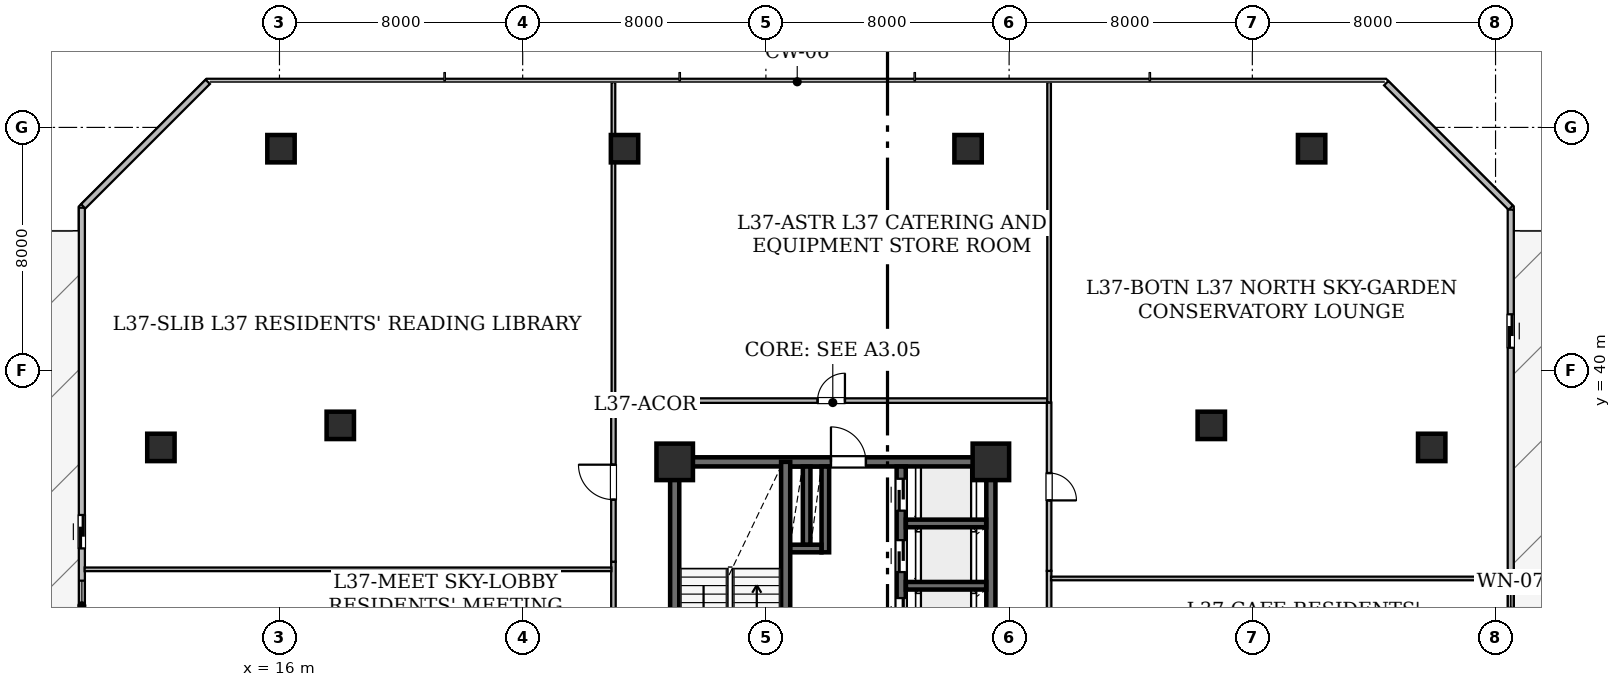
"""IFC4 building model, lengths in metres.
Left out: names, types, materials, properties, quantities, classifications, styles, units other than length and angle.
Written with IfcOpenShell. Run it as: python <this file> out.ifc"""

import sys

from ifc_helpers import new_model, si_unit, direction, frame, frame_2d, origin, origin_2d, place, context, subcontext, project, spatial, rectangle, hollow_rectangle, extrude, element, fill, save


model = new_model("IFC4")
c1 = context("Model", 3, precision=1e-05, world=origin(), true_north=direction((0.0, 1.0)))
c2 = subcontext(c1, "Body", "Model", "MODEL_VIEW")
j1 = project(units=[si_unit("LENGTHUNIT", "METRE"), si_unit("PLANEANGLEUNIT", "RADIAN")], contexts=[c1])
p1 = place(None, origin())
s1 = spatial("IfcSite", under=j1, at=p1, CompositionType="ELEMENT")
p2 = place(p1, origin())
s2 = spatial("IfcBuilding", under=s1, at=p2, CompositionType="ELEMENT")
p3 = place(p2, frame((0.0, 0.0, 145.7)))
s3 = spatial("IfcBuildingStorey", under=s2, at=p3, CompositionType="ELEMENT", Elevation=145.7)
for number, where, z_axis, x_axis in (
    (1, (29.0, 37.0, 0.0), (0.0, 0.0, 1.0), (1.0, 0.0, 0.0)),
    (2, (39.4, 37.0, 0.0), (0.0, 0.0, 1.0), (1.0, 0.0, 0.0)),
):
    element("IfcColumn", number, at=place(p3, frame(where, z_axis=z_axis, x_axis=x_axis)), inside=s3, PredefinedType="COLUMN", context=c2, shape_type="SweptSolid", body=[
        extrude(hollow_rectangle(XDim=1.2, YDim=1.2, WallThickness=0.06, at=origin_2d()), origin(), (0.0, 0.0, 1.0), 4.8),
    ])
for number, where, z_axis, x_axis in (
    (3, (16.05, 47.3, 0.0), (0.0, 0.0, 1.0), (1.0, 0.0, 0.0)),
    (4, (27.35, 47.3, 0.0), (0.0, 0.0, 1.0), (1.0, 0.0, 0.0)),
    (5, (38.65, 47.3, 0.0), (0.0, 0.0, 1.0), (1.0, 0.0, 0.0)),
    (6, (49.95, 47.3, 0.0), (0.0, 0.0, 1.0), (1.0, 0.0, 0.0)),
    (7, (12.1, 37.475, 0.0), (0.0, 0.0, 1.0), (1.0, 0.0, 0.0)),
    (8, (53.9, 37.475, 0.0), (0.0, 0.0, 1.0), (1.0, 0.0, 0.0)),
    (9, (18.0, 38.2, 0.0), (0.0, 0.0, 1.0), (1.0, 0.0, 0.0)),
    (10, (46.65, 38.2, 0.0), (0.0, 0.0, 1.0), (1.0, 0.0, 0.0)),
):
    element("IfcColumn", number, at=place(p3, frame(where, z_axis=z_axis, x_axis=x_axis)), inside=s3, PredefinedType="COLUMN", context=c2, shape_type="SweptSolid", body=[
        extrude(hollow_rectangle(XDim=0.9, YDim=0.9, WallThickness=0.045, at=origin_2d()), origin(), (0.0, 0.0, 1.0), 4.8),
    ])
p4 = place(p3, frame((9.5, 31.284, 0.0), z_axis=(0.0, 0.0, 1.0), x_axis=(0.0, 1.0, 0.0)))
e11 = element("IfcWall", 11, at=p4, inside=s3, PredefinedType="STANDARD", context=c2, shape_type="SweptSolid", body=[
    extrude(rectangle(XDim=14.075, YDim=0.2, at=frame_2d((7.038, 0.0))), origin(), (0.0, 0.0, 1.0), 4.48),
])
p5 = place(p4, frame((2.869, 0.0, 0.0)))
e12 = element("IfcOpeningElement", 12, at=p5, cuts=e11, PredefinedType="OPENING", context=c2, shape_type="SweptSolid", body=[
    extrude(rectangle(XDim=1.1, YDim=2.2, at=frame_2d((0.55, 1.1))), frame((0.0, 0.11, 0.0), z_axis=(0.0, -1.0, 0.0), x_axis=(1.0, 0.0, 0.0)), (0.0, 0.0, 1.0), 0.22),
])
p6 = place(p4, frame((0.158, 0.0, 0.85)))
e13 = element("IfcOpeningElement", 13, at=p6, cuts=e11, PredefinedType="OPENING", context=c2, shape_type="SweptSolid", body=[
    extrude(rectangle(XDim=1.65, YDim=1.55, at=frame_2d((0.825, 0.775))), frame((0.0, 0.11, 0.0), z_axis=(0.0, -1.0, 0.0), x_axis=(1.0, 0.0, 0.0)), (0.0, 0.0, 1.0), 0.22),
])
p7 = place(p3, frame((9.544, 45.403, 0.0), z_axis=(0.0, 0.0, 1.0), x_axis=(0.707127848917, 0.707085712828, 0.0)))
e14 = element("IfcWall", 14, at=p7, inside=s3, PredefinedType="STANDARD", context=c2, shape_type="SweptSolid", body=[
    extrude(rectangle(XDim=5.794, YDim=0.2, at=frame_2d((2.897, 0.0))), origin(), (0.0, 0.0, 1.0), 4.48),
])
p8 = place(p3, frame((52.404, 49.455, 0.0), z_axis=(0.0, 0.0, 1.0), x_axis=(0.707085707805, -0.70712785394, 0.0)))
e15 = element("IfcWall", 15, at=p8, inside=s3, PredefinedType="STANDARD", context=c2, shape_type="SweptSolid", body=[
    extrude(rectangle(XDim=5.793, YDim=0.2, at=frame_2d((2.896, 0.0))), origin(), (0.0, 0.0, 1.0), 4.48),
])
p9 = place(p3, frame((56.5, 45.296, 0.0), z_axis=(0.0, 0.0, 1.0), x_axis=(0.0, -1.0, 0.0)))
e16 = element("IfcWall", 16, at=p9, inside=s3, PredefinedType="STANDARD", context=c2, shape_type="SweptSolid", body=[
    extrude(rectangle(XDim=14.063, YDim=0.2, at=frame_2d((7.031, 0.0))), origin(), (0.0, 0.0, 1.0), 4.48),
])
p10 = place(p9, frame((3.443, 0.0, 0.0)))
e17 = element("IfcOpeningElement", 17, at=p10, cuts=e16, PredefinedType="OPENING", context=c2, shape_type="SweptSolid", body=[
    extrude(rectangle(XDim=1.1, YDim=2.2, at=frame_2d((0.55, 1.1))), frame((0.0, 0.11, 0.0), z_axis=(0.0, -1.0, 0.0), x_axis=(1.0, 0.0, 0.0)), (0.0, 0.0, 1.0), 0.22),
])
p11 = place(p9, frame((12.53, 0.0, 0.85)))
e18 = element("IfcOpeningElement", 18, at=p11, cuts=e16, PredefinedType="OPENING", context=c2, shape_type="SweptSolid", body=[
    extrude(rectangle(XDim=1.35, YDim=1.5, at=frame_2d((0.675, 0.75))), frame((0.0, 0.11, 0.0), z_axis=(0.0, -1.0, 0.0), x_axis=(1.0, 0.0, 0.0)), (0.0, 0.0, 1.0), 0.22),
])
p12 = place(p3, frame((29.0, 28.0, 0.0), z_axis=(0.0, 0.0, 1.0), x_axis=(0.0, 1.0, 0.0)))
e19 = element("IfcWall", 19, at=p12, inside=s3, PredefinedType="SHEAR", context=c2, shape_type="SweptSolid", body=[
    extrude(rectangle(XDim=9.0, YDim=0.3, at=frame_2d((4.5, 0.0))), origin(), (0.0, 0.0, 1.0), 4.48),
])
p13 = place(p3, frame((29.0, 37.0, 0.0), z_axis=(0.0, 0.0, 1.0), x_axis=(1.0, 0.0, 0.0)))
e20 = element("IfcWall", 20, at=p13, inside=s3, PredefinedType="SHEAR", context=c2, shape_type="SweptSolid", body=[
    extrude(rectangle(XDim=10.4, YDim=0.3, at=frame_2d((5.2, 0.0))), origin(), (0.0, 0.0, 1.0), 4.48),
])
p14 = place(p13, frame((5.14, 0.0, 0.0)))
e21 = element("IfcOpeningElement", 21, at=p14, cuts=e20, PredefinedType="OPENING", context=c2, shape_type="SweptSolid", body=[
    extrude(rectangle(XDim=1.15, YDim=2.2, at=frame_2d((0.575, 1.1))), frame((0.0, 0.16, 0.0), z_axis=(0.0, -1.0, 0.0), x_axis=(1.0, 0.0, 0.0)), (0.0, 0.0, 1.0), 0.32),
])
p15 = place(p3, frame((39.4, 24.4, 0.0), z_axis=(0.0, 0.0, 1.0), x_axis=(0.0, 1.0, 0.0)))
e22 = element("IfcWall", 22, at=p15, inside=s3, PredefinedType="SHEAR", context=c2, shape_type="SweptSolid", body=[
    extrude(rectangle(XDim=12.6, YDim=0.3, at=frame_2d((6.3, 0.0))), origin(), (0.0, 0.0, 1.0), 4.48),
])
p16 = place(p3, frame((32.65, 28.0, 0.0), z_axis=(0.0, 0.0, 1.0), x_axis=(0.0, 1.0, 0.0)))
e23 = element("IfcWall", 23, at=p16, inside=s3, PredefinedType="SHEAR", context=c2, shape_type="SweptSolid", body=[
    extrude(rectangle(XDim=9.0, YDim=0.3, at=frame_2d((4.5, 0.0))), origin(), (0.0, 0.0, 1.0), 4.48),
])
p17 = place(p16, frame((0.72, 0.0, 0.0)))
e24 = element("IfcOpeningElement", 24, at=p17, cuts=e23, PredefinedType="OPENING", context=c2, shape_type="SweptSolid", body=[
    extrude(rectangle(XDim=1.0, YDim=2.15, at=frame_2d((0.5, 1.075))), frame((0.0, 0.16, 0.0), z_axis=(0.0, -1.0, 0.0), x_axis=(1.0, 0.0, 0.0)), (0.0, 0.0, 1.0), 0.32),
])
p18 = place(p3, frame((36.45, 31.35, 0.0), z_axis=(0.0, 0.0, 1.0), x_axis=(0.0, 1.0, 0.0)))
e25 = element("IfcWall", 25, at=p18, inside=s3, PredefinedType="SHEAR", context=c2, shape_type="SweptSolid", body=[
    extrude(rectangle(XDim=5.496, YDim=0.3, at=frame_2d((2.748, 0.0))), origin(), (0.0, 0.0, 1.0), 4.48),
])
p19 = place(p18, frame((0.12, 0.0, 0.0)))
e26 = element("IfcOpeningElement", 26, at=p19, cuts=e25, PredefinedType="OPENING", context=c2, shape_type="SweptSolid", body=[
    extrude(rectangle(XDim=1.05, YDim=2.15, at=frame_2d((0.525, 1.075))), frame((0.0, 0.16, 0.0), z_axis=(0.0, -1.0, 0.0), x_axis=(1.0, 0.0, 0.0)), (0.0, 0.0, 1.0), 0.32),
])
p20 = place(p18, frame((2.025, 0.0, 0.0)))
e27 = element("IfcOpeningElement", 27, at=p20, cuts=e25, PredefinedType="OPENING", context=c2, shape_type="SweptSolid", body=[
    extrude(rectangle(XDim=1.05, YDim=2.15, at=frame_2d((0.525, 1.075))), frame((0.0, 0.16, 0.0), z_axis=(0.0, -1.0, 0.0), x_axis=(1.0, 0.0, 0.0)), (0.0, 0.0, 1.0), 0.32),
])
p21 = place(p18, frame((4.045, 0.0, 0.0)))
e28 = element("IfcOpeningElement", 28, at=p21, cuts=e25, PredefinedType="OPENING", context=c2, shape_type="SweptSolid", body=[
    extrude(rectangle(XDim=1.05, YDim=2.15, at=frame_2d((0.525, 1.075))), frame((0.0, 0.16, 0.0), z_axis=(0.0, -1.0, 0.0), x_axis=(1.0, 0.0, 0.0)), (0.0, 0.0, 1.0), 0.32),
])
for number, where, z_axis, x_axis in (
    (29, (36.604, 32.925, 0.0), (0.0, 0.0, 1.0), (1.0, 0.0, 0.0)),
    (30, (36.604, 34.975, 0.0), (0.0, 0.0, 1.0), (1.0, 0.0, 0.0)),
):
    element("IfcWall", number, at=place(p3, frame(where, z_axis=z_axis, x_axis=x_axis)), inside=s3, PredefinedType="SHEAR", context=c2, shape_type="SweptSolid", body=[
        extrude(rectangle(XDim=2.642, YDim=0.25, at=frame_2d((1.321, 0.0))), origin(), (0.0, 0.0, 1.0), 4.48),
    ])
p22 = place(p3, frame((33.955, 34.025, 0.0), z_axis=(0.0, 0.0, 1.0), x_axis=(0.0, 1.0, 0.0)))
e31 = element("IfcWall", 31, at=p22, inside=s3, PredefinedType="SHEAR", context=c2, shape_type="SweptSolid", body=[
    extrude(rectangle(XDim=2.821, YDim=0.25, at=frame_2d((1.411, 0.0))), origin(), (0.0, 0.0, 1.0), 4.48),
])
p23 = place(p3, frame((32.804, 34.15, 0.0), z_axis=(0.0, 0.0, 1.0), x_axis=(1.0, 0.0, 0.0)))
e32 = element("IfcWall", 32, at=p23, inside=s3, PredefinedType="SHEAR", context=c2, shape_type="SweptSolid", body=[
    extrude(rectangle(XDim=1.022, YDim=0.25, at=frame_2d((0.511, 0.0))), origin(), (0.0, 0.0, 1.0), 4.48),
])
p24 = place(p3, frame((33.34, 34.279, 0.0), z_axis=(0.0, 0.0, 1.0), x_axis=(0.0, 1.0, 0.0)))
e33 = element("IfcWall", 33, at=p24, inside=s3, PredefinedType="SHEAR", context=c2, shape_type="SweptSolid", body=[
    extrude(rectangle(XDim=2.567, YDim=0.25, at=frame_2d((1.283, 0.0))), origin(), (0.0, 0.0, 1.0), 4.48),
])
p25 = place(p3, frame((26.985, 28.314, 0.0), z_axis=(0.0, 0.0, 1.0), x_axis=(0.0, 1.0, 0.0)))
e34 = element("IfcWall", 34, at=p25, inside=s3, PredefinedType="STANDARD", context=c2, shape_type="SweptSolid", body=[
    extrude(rectangle(XDim=5.4, YDim=0.15, at=frame_2d((2.7, 0.0))), origin(), (0.0, 0.0, 1.0), 4.48),
])
p26 = place(p25, frame((2.229, 0.0, 0.0)))
e35 = element("IfcOpeningElement", 35, at=p26, cuts=e34, PredefinedType="OPENING", context=c2, shape_type="SweptSolid", body=[
    extrude(rectangle(XDim=0.9, YDim=2.1, at=frame_2d((0.45, 1.05))), frame((0.0, 0.085, 0.0), z_axis=(0.0, -1.0, 0.0), x_axis=(1.0, 0.0, 0.0)), (0.0, 0.0, 1.0), 0.17),
])
p27 = place(p3, frame((26.985, 33.714, 0.0), z_axis=(0.0, 0.0, 1.0), x_axis=(0.0, 1.0, 0.0)))
e36 = element("IfcWall", 36, at=p27, inside=s3, PredefinedType="STANDARD", context=c2, shape_type="SweptSolid", body=[
    extrude(rectangle(XDim=5.236, YDim=0.15, at=frame_2d((2.618, 0.0))), origin(), (0.0, 0.0, 1.0), 3.775),
])
p28 = place(p27, frame((2.043, 0.0, 0.0)))
e37 = element("IfcOpeningElement", 37, at=p28, cuts=e36, PredefinedType="OPENING", context=c2, shape_type="SweptSolid", body=[
    extrude(rectangle(XDim=1.15, YDim=2.2, at=frame_2d((0.575, 1.1))), frame((0.0, 0.085, 0.0), z_axis=(0.0, -1.0, 0.0), x_axis=(1.0, 0.0, 0.0)), (0.0, 0.0, 1.0), 0.17),
])
p29 = place(p3, frame((41.315, 33.414, 0.0), z_axis=(0.0, 0.0, 1.0), x_axis=(0.0, -1.0, 0.0)))
e38 = element("IfcWall", 38, at=p29, inside=s3, PredefinedType="STANDARD", context=c2, shape_type="SweptSolid", body=[
    extrude(rectangle(XDim=5.1, YDim=0.15, at=frame_2d((2.55, 0.0))), origin(), (0.0, 0.0, 1.0), 4.48),
])
p30 = place(p29, frame((1.996, 0.0, 0.0)))
e39 = element("IfcOpeningElement", 39, at=p30, cuts=e38, PredefinedType="OPENING", context=c2, shape_type="SweptSolid", body=[
    extrude(rectangle(XDim=1.15, YDim=2.2, at=frame_2d((0.575, 1.1))), frame((0.0, 0.085, 0.0), z_axis=(0.0, -1.0, 0.0), x_axis=(1.0, 0.0, 0.0)), (0.0, 0.0, 1.0), 0.17),
])
p31 = place(p3, frame((41.315, 38.95, 0.0), z_axis=(0.0, 0.0, 1.0), x_axis=(0.0, -1.0, 0.0)))
e40 = element("IfcWall", 40, at=p31, inside=s3, PredefinedType="STANDARD", context=c2, shape_type="SweptSolid", body=[
    extrude(rectangle(XDim=5.536, YDim=0.15, at=frame_2d((2.768, 0.0))), origin(), (0.0, 0.0, 1.0), 3.775),
])
p32 = place(p31, frame((2.318, 0.0, 0.0)))
e41 = element("IfcOpeningElement", 41, at=p32, cuts=e40, PredefinedType="OPENING", context=c2, shape_type="SweptSolid", body=[
    extrude(rectangle(XDim=0.9, YDim=2.1, at=frame_2d((0.45, 1.05))), frame((0.0, 0.085, 0.0), z_axis=(0.0, -1.0, 0.0), x_axis=(1.0, 0.0, 0.0)), (0.0, 0.0, 1.0), 0.17),
])
p33 = place(p3, frame((27.05, 39.015, 0.0), z_axis=(0.0, 0.0, 1.0), x_axis=(1.0, 0.0, 0.0)))
e42 = element("IfcWall", 42, at=p33, inside=s3, PredefinedType="STANDARD", context=c2, shape_type="SweptSolid", body=[
    extrude(rectangle(XDim=14.2, YDim=0.15, at=frame_2d((7.1, 0.0))), origin(), (0.0, 0.0, 1.0), 3.775),
])
p34 = place(p33, frame((6.65, 0.0, 0.0)))
e43 = element("IfcOpeningElement", 43, at=p34, cuts=e42, PredefinedType="OPENING", context=c2, shape_type="SweptSolid", body=[
    extrude(rectangle(XDim=0.9, YDim=2.1, at=frame_2d((0.45, 1.05))), frame((0.0, 0.085, 0.0), z_axis=(0.0, -1.0, 0.0), x_axis=(1.0, 0.0, 0.0)), (0.0, 0.0, 1.0), 0.17),
])
p35 = place(p3, frame((9.592, 33.465, 0.0), z_axis=(0.0, 0.0, 1.0), x_axis=(1.0, 0.0, 0.0)))
e44 = element("IfcWall", 44, at=p35, inside=s3, PredefinedType="PARTITIONING", context=c2, shape_type="SweptSolid", body=[
    extrude(rectangle(XDim=17.326, YDim=0.12, at=frame_2d((8.663, 0.0))), origin(), (0.0, 0.0, 1.0), 3.775),
])
p36 = place(p3, frame((26.985, 49.49, 0.0), z_axis=(0.0, 0.0, 1.0), x_axis=(0.0, -1.0, 0.0)))
e45 = element("IfcWall", 45, at=p36, inside=s3, PredefinedType="PARTITIONING", context=c2, shape_type="SweptSolid", body=[
    extrude(rectangle(XDim=10.54, YDim=0.12, at=frame_2d((5.27, 0.0))), origin(), (0.0, 0.0, 1.0), 3.926),
])
p37 = place(p3, frame((41.38, 33.165, 0.0), z_axis=(0.0, 0.0, 1.0), x_axis=(1.0, 0.0, 0.0)))
e46 = element("IfcWall", 46, at=p37, inside=s3, PredefinedType="PARTITIONING", context=c2, shape_type="SweptSolid", body=[
    extrude(rectangle(XDim=15.028, YDim=0.12, at=frame_2d((7.514, 0.0))), origin(), (0.0, 0.0, 1.0), 3.775),
])
p38 = place(p3, frame((41.315, 38.95, 0.0), z_axis=(0.0, 0.0, 1.0), x_axis=(0.0, 1.0, 0.0)))
e47 = element("IfcWall", 47, at=p38, inside=s3, PredefinedType="PARTITIONING", context=c2, shape_type="SweptSolid", body=[
    extrude(rectangle(XDim=10.54, YDim=0.12, at=frame_2d((5.27, 0.0))), origin(), (0.0, 0.0, 1.0), 3.926),
])
p39 = place(p5, origin())
e48 = element("IfcDoor", 48, at=p39, inside=s3, OperationType="SLIDING_TO_LEFT", PredefinedType="DOOR", context=c2, shape_type="SweptSolid", body=[
    extrude(rectangle(XDim=1.1, YDim=2.2, at=frame_2d((0.55, 1.1))), frame((0.0, 0.025, 0.0), z_axis=(0.0, -1.0, 0.0), x_axis=(1.0, 0.0, 0.0)), (0.0, 0.0, 1.0), 0.05),
])
fill(e12, e48)
p40 = place(p10, origin())
e49 = element("IfcDoor", 49, at=p40, inside=s3, OperationType="SLIDING_TO_LEFT", PredefinedType="DOOR", context=c2, shape_type="SweptSolid", body=[
    extrude(rectangle(XDim=1.1, YDim=2.2, at=frame_2d((0.55, 1.1))), frame((0.0, 0.025, 0.0), z_axis=(0.0, -1.0, 0.0), x_axis=(1.0, 0.0, 0.0)), (0.0, 0.0, 1.0), 0.05),
])
fill(e17, e49)
p41 = place(p6, origin())
e50 = element("IfcWindow", 50, at=p41, inside=s3, PartitioningType="SINGLE_PANEL", PredefinedType="WINDOW", context=c2, shape_type="SweptSolid", body=[
    extrude(rectangle(XDim=1.65, YDim=1.55, at=frame_2d((0.825, 0.775))), frame((0.0, 0.03, 0.0), z_axis=(0.0, -1.0, 0.0), x_axis=(1.0, 0.0, 0.0)), (0.0, 0.0, 1.0), 0.06),
])
fill(e13, e50)
p42 = place(p11, origin())
e51 = element("IfcWindow", 51, at=p42, inside=s3, PartitioningType="SINGLE_PANEL", PredefinedType="WINDOW", context=c2, shape_type="SweptSolid", body=[
    extrude(rectangle(XDim=1.35, YDim=1.5, at=frame_2d((0.675, 0.75))), frame((0.0, 0.03, 0.0), z_axis=(0.0, -1.0, 0.0), x_axis=(1.0, 0.0, 0.0)), (0.0, 0.0, 1.0), 0.06),
])
fill(e18, e51)
p43 = place(p14, origin())
e52 = element("IfcDoor", 52, at=p43, inside=s3, OperationType="SINGLE_SWING_LEFT", PredefinedType="DOOR", context=c2, shape_type="SweptSolid", body=[
    extrude(rectangle(XDim=1.15, YDim=2.2, at=frame_2d((0.575, 1.1))), frame((0.0, 0.025, 0.0), z_axis=(0.0, -1.0, 0.0), x_axis=(1.0, 0.0, 0.0)), (0.0, 0.0, 1.0), 0.05),
])
fill(e21, e52)
p44 = place(p19, origin())
e53 = element("IfcDoor", 53, at=p44, inside=s3, OperationType="SLIDING_TO_LEFT", PredefinedType="DOOR", context=c2, shape_type="SweptSolid", body=[
    extrude(rectangle(XDim=1.05, YDim=2.15, at=frame_2d((0.525, 1.075))), frame((0.0, 0.025, 0.0), z_axis=(0.0, -1.0, 0.0), x_axis=(1.0, 0.0, 0.0)), (0.0, 0.0, 1.0), 0.05),
])
fill(e26, e53)
p45 = place(p20, origin())
e54 = element("IfcDoor", 54, at=p45, inside=s3, OperationType="SLIDING_TO_LEFT", PredefinedType="DOOR", context=c2, shape_type="SweptSolid", body=[
    extrude(rectangle(XDim=1.05, YDim=2.15, at=frame_2d((0.525, 1.075))), frame((0.0, 0.025, 0.0), z_axis=(0.0, -1.0, 0.0), x_axis=(1.0, 0.0, 0.0)), (0.0, 0.0, 1.0), 0.05),
])
fill(e27, e54)
p46 = place(p21, origin())
e55 = element("IfcDoor", 55, at=p46, inside=s3, OperationType="SLIDING_TO_LEFT", PredefinedType="DOOR", context=c2, shape_type="SweptSolid", body=[
    extrude(rectangle(XDim=1.05, YDim=2.15, at=frame_2d((0.525, 1.075))), frame((0.0, 0.025, 0.0), z_axis=(0.0, -1.0, 0.0), x_axis=(1.0, 0.0, 0.0)), (0.0, 0.0, 1.0), 0.05),
])
fill(e28, e55)
p47 = place(p28, origin())
e56 = element("IfcDoor", 56, at=p47, inside=s3, OperationType="SINGLE_SWING_RIGHT", PredefinedType="DOOR", context=c2, shape_type="SweptSolid", body=[
    extrude(rectangle(XDim=1.15, YDim=2.2, at=frame_2d((0.575, 1.1))), frame((0.0, 0.025, 0.0), z_axis=(0.0, -1.0, 0.0), x_axis=(1.0, 0.0, 0.0)), (0.0, 0.0, 1.0), 0.05),
])
fill(e37, e56)
p48 = place(p32, origin())
e57 = element("IfcDoor", 57, at=p48, inside=s3, OperationType="SINGLE_SWING_RIGHT", PredefinedType="DOOR", context=c2, shape_type="SweptSolid", body=[
    extrude(rectangle(XDim=0.9, YDim=2.1, at=frame_2d((0.45, 1.05))), frame((0.0, 0.025, 0.0), z_axis=(0.0, -1.0, 0.0), x_axis=(1.0, 0.0, 0.0)), (0.0, 0.0, 1.0), 0.05),
])
fill(e41, e57)
p49 = place(p34, origin())
e58 = element("IfcDoor", 58, at=p49, inside=s3, OperationType="SINGLE_SWING_RIGHT", PredefinedType="DOOR", context=c2, shape_type="SweptSolid", body=[
    extrude(rectangle(XDim=0.9, YDim=2.1, at=frame_2d((0.45, 1.05))), frame((0.0, 0.025, 0.0), z_axis=(0.0, -1.0, 0.0), x_axis=(1.0, 0.0, 0.0)), (0.0, 0.0, 1.0), 0.05),
])
fill(e43, e58)
save(model, sys.argv[1])
